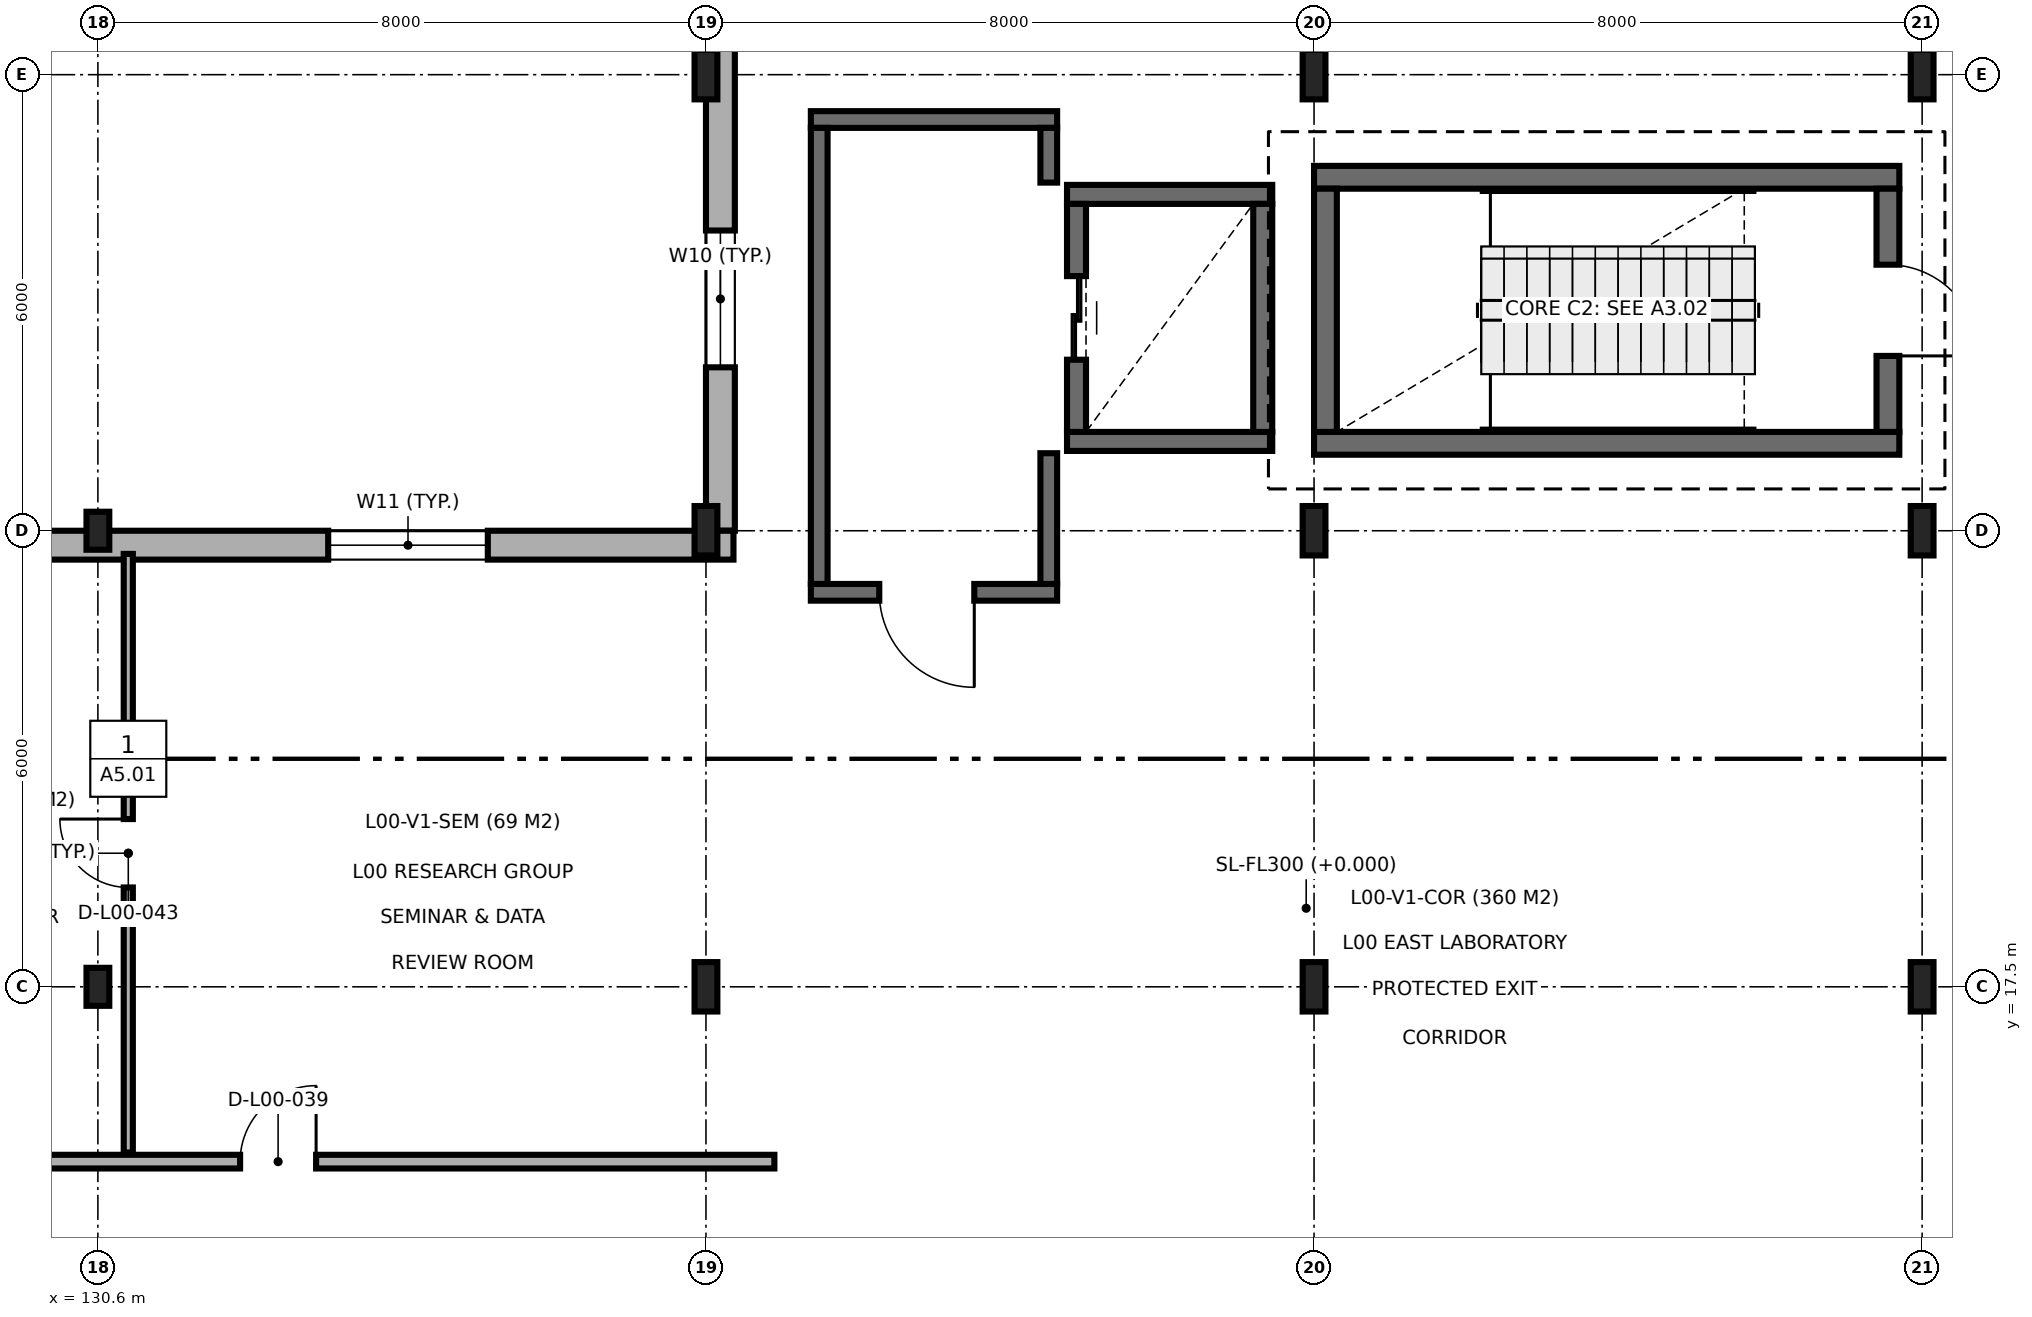
"""IFC4 building model, lengths in metres.
Left out: names, types, materials, properties, quantities, classifications, styles, units other than length and angle.
Written with IfcOpenShell. Run it as: python <this file> out.ifc"""

import sys

from ifc_helpers import new_model, si_unit, direction, frame, frame_2d, origin, origin_2d, place, context, subcontext, project, spatial, rectangle, i_section, extrude, element, fill, save


model = new_model("IFC4")
c1 = context("Model", 3, precision=1e-05, world=origin(), true_north=direction((0.0, 1.0)))
c2 = subcontext(c1, "Body", "Model", "MODEL_VIEW")
j1 = project(units=[si_unit("LENGTHUNIT", "METRE"), si_unit("PLANEANGLEUNIT", "RADIAN")], contexts=[c1])
p1 = place(None, origin())
s1 = spatial("IfcSite", under=j1, at=p1, CompositionType="ELEMENT")
p2 = place(p1, origin())
s2 = spatial("IfcBuilding", under=s1, at=p2, CompositionType="ELEMENT")
p3 = place(p2, origin())
s3 = spatial("IfcBuildingStorey", under=s2, at=p3, CompositionType="ELEMENT", Elevation=0.0)
for number, where, z_axis, x_axis in (
    (1, (130.6, 17.5, 0.0), (0.0, 0.0, 1.0), (1.0, 0.0, 0.0)),
    (2, (130.6, 23.5, 0.0), (0.0, 0.0, 1.0), (1.0, 0.0, 0.0)),
):
    element("IfcColumn", number, at=place(p3, frame(where, z_axis=z_axis, x_axis=x_axis)), inside=s3, PredefinedType="COLUMN", context=c2, shape_type="SweptSolid", body=[
        extrude(i_section(OverallWidth=0.3, OverallDepth=0.5, WebThickness=0.014, FlangeThickness=0.028, FilletRadius=0.027, at=origin_2d()), origin(), (0.0, 0.0, 1.0), 4.8),
    ])
for number, where, z_axis, x_axis in (
    (3, (138.6, 17.5, 0.0), (0.0, 0.0, 1.0), (1.0, 0.0, 0.0)),
    (4, (138.6, 23.5, 0.0), (0.0, 0.0, 1.0), (1.0, 0.0, 0.0)),
    (5, (138.6, 29.5, 0.0), (0.0, 0.0, 1.0), (1.0, 0.0, 0.0)),
    (6, (146.6, 17.5, 0.0), (0.0, 0.0, 1.0), (1.0, 0.0, 0.0)),
    (7, (146.6, 23.5, 0.0), (0.0, 0.0, 1.0), (1.0, 0.0, 0.0)),
    (8, (146.6, 29.5, 0.0), (0.0, 0.0, 1.0), (1.0, 0.0, 0.0)),
    (9, (154.6, 17.5, 0.0), (0.0, 0.0, 1.0), (1.0, 0.0, 0.0)),
    (10, (154.6, 23.5, 0.0), (0.0, 0.0, 1.0), (1.0, 0.0, 0.0)),
    (11, (154.6, 29.5, 0.0), (0.0, 0.0, 1.0), (1.0, 0.0, 0.0)),
):
    element("IfcColumn", number, at=place(p3, frame(where, z_axis=z_axis, x_axis=x_axis)), inside=s3, PredefinedType="COLUMN", context=c2, shape_type="SweptSolid", body=[
        extrude(i_section(OverallWidth=0.3, OverallDepth=0.65, WebThickness=0.016, FlangeThickness=0.031, FilletRadius=0.027, at=origin_2d()), origin(), (0.0, 0.0, 1.0), 4.8),
    ])
for number, where, z_axis, x_axis in (
    (12, (146.6, 24.65, 0.0), (0.0, 0.0, 1.0), (1.0, 0.0, 0.0)),
    (13, (154.3, 28.15, 0.0), (0.0, 0.0, 1.0), (-1.0, 0.0, 0.0)),
):
    element("IfcWall", number, at=place(p3, frame(where, z_axis=z_axis, x_axis=x_axis)), inside=s3, PredefinedType="SHEAR", context=c2, shape_type="SweptSolid", body=[
        extrude(rectangle(XDim=7.7, YDim=0.3, at=frame_2d((3.85, 0.0))), origin(), (0.0, 0.0, 1.0), 4.8),
    ])
p4 = place(p3, frame((146.75, 28.0, 0.0), z_axis=(0.0, 0.0, 1.0), x_axis=(0.0, -1.0, 0.0)))
e14 = element("IfcWall", 14, at=p4, inside=s3, PredefinedType="SHEAR", context=c2, shape_type="SweptSolid", body=[
    extrude(rectangle(XDim=3.2, YDim=0.3, at=frame_2d((1.6, 0.0))), origin(), (0.0, 0.0, 1.0), 4.8),
])
p5 = place(p3, frame((154.15, 24.8, 0.0), z_axis=(0.0, 0.0, 1.0), x_axis=(0.0, 1.0, 0.0)))
e15 = element("IfcWall", 15, at=p5, inside=s3, PredefinedType="SHEAR", context=c2, shape_type="SweptSolid", body=[
    extrude(rectangle(XDim=3.2, YDim=0.3, at=frame_2d((1.6, 0.0))), origin(), (0.0, 0.0, 1.0), 4.8),
])
p6 = place(p5, frame((1.0, 0.0, 0.0)))
e16 = element("IfcOpeningElement", 16, at=p6, cuts=e15, PredefinedType="OPENING", context=c2, shape_type="SweptSolid", body=[
    extrude(rectangle(XDim=1.2, YDim=2.15, at=frame_2d((0.6, 1.075))), frame((0.0, 0.16, 0.0), z_axis=(0.0, -1.0, 0.0), x_axis=(1.0, 0.0, 0.0)), (0.0, 0.0, 1.0), 0.32),
])
for number, where, z_axis, x_axis in (
    (17, (143.35, 24.675, 0.0), (0.0, 0.0, 1.0), (1.0, 0.0, 0.0)),
    (18, (146.05, 27.925, 0.0), (0.0, 0.0, 1.0), (-1.0, 0.0, 0.0)),
):
    element("IfcWall", number, at=place(p3, frame(where, z_axis=z_axis, x_axis=x_axis)), inside=s3, PredefinedType="SHEAR", context=c2, shape_type="SweptSolid", body=[
        extrude(rectangle(XDim=2.7, YDim=0.25, at=frame_2d((1.35, 0.0))), origin(), (0.0, 0.0, 1.0), 4.8),
    ])
p7 = place(p3, frame((143.475, 27.8, 0.0), z_axis=(0.0, 0.0, 1.0), x_axis=(0.0, -1.0, 0.0)))
e19 = element("IfcWall", 19, at=p7, inside=s3, PredefinedType="SHEAR", context=c2, shape_type="SweptSolid", body=[
    extrude(rectangle(XDim=3.0, YDim=0.25, at=frame_2d((1.5, 0.0))), origin(), (0.0, 0.0, 1.0), 4.8),
])
p8 = place(p7, frame((0.95, 0.0, 0.0)))
e20 = element("IfcOpeningElement", 20, at=p8, cuts=e19, PredefinedType="OPENING", context=c2, shape_type="SweptSolid", body=[
    extrude(rectangle(XDim=1.1, YDim=2.15, at=frame_2d((0.55, 1.075))), frame((0.0, 0.135, 0.0), z_axis=(0.0, -1.0, 0.0), x_axis=(1.0, 0.0, 0.0)), (0.0, 0.0, 1.0), 0.27),
])
p9 = place(p3, frame((145.925, 24.8, 0.0), z_axis=(0.0, 0.0, 1.0), x_axis=(0.0, 1.0, 0.0)))
e21 = element("IfcWall", 21, at=p9, inside=s3, PredefinedType="SHEAR", context=c2, shape_type="SweptSolid", body=[
    extrude(rectangle(XDim=3.0, YDim=0.25, at=frame_2d((1.5, 0.0))), origin(), (0.0, 0.0, 1.0), 4.8),
])
p10 = place(p3, frame((139.98, 22.69, 0.0), z_axis=(0.0, 0.0, 1.0), x_axis=(1.0, 0.0, 0.0)))
e22 = element("IfcWall", 22, at=p10, inside=s3, PredefinedType="SOLIDWALL", context=c2, shape_type="SweptSolid", body=[
    extrude(rectangle(XDim=3.24, YDim=0.22, at=frame_2d((1.62, 0.0))), origin(), (0.0, 0.0, 1.0), 4.55),
])
p11 = place(p10, frame((0.9, 0.0, 0.0)))
e23 = element("IfcOpeningElement", 23, at=p11, cuts=e22, PredefinedType="OPENING", context=c2, shape_type="SweptSolid", body=[
    extrude(rectangle(XDim=1.25, YDim=2.15, at=frame_2d((0.625, 1.075))), frame((0.0, 0.12, 0.0), z_axis=(0.0, -1.0, 0.0), x_axis=(1.0, 0.0, 0.0)), (0.0, 0.0, 1.0), 0.24),
])
p12 = place(p3, frame((143.22, 28.91, 0.0), z_axis=(0.0, 0.0, 1.0), x_axis=(-1.0, 0.0, 0.0)))
e24 = element("IfcWall", 24, at=p12, inside=s3, PredefinedType="SOLIDWALL", context=c2, shape_type="SweptSolid", body=[
    extrude(rectangle(XDim=3.24, YDim=0.22, at=frame_2d((1.62, 0.0))), origin(), (0.0, 0.0, 1.0), 4.55),
])
p13 = place(p3, frame((140.09, 28.8, 0.0), z_axis=(0.0, 0.0, 1.0), x_axis=(0.0, -1.0, 0.0)))
e25 = element("IfcWall", 25, at=p13, inside=s3, PredefinedType="SOLIDWALL", context=c2, shape_type="SweptSolid", body=[
    extrude(rectangle(XDim=6.0, YDim=0.22, at=frame_2d((3.0, 0.0))), origin(), (0.0, 0.0, 1.0), 4.55),
])
p14 = place(p3, frame((143.11, 22.8, 0.0), z_axis=(0.0, 0.0, 1.0), x_axis=(0.0, 1.0, 0.0)))
e26 = element("IfcWall", 26, at=p14, inside=s3, PredefinedType="SOLIDWALL", context=c2, shape_type="SweptSolid", body=[
    extrude(rectangle(XDim=1.72, YDim=0.22, at=frame_2d((0.86, 0.0))), origin(), (0.0, 0.0, 1.0), 4.55),
])
p15 = place(p3, frame((143.11, 28.08, 0.0), z_axis=(0.0, 0.0, 1.0), x_axis=(0.0, 1.0, 0.0)))
e27 = element("IfcWall", 27, at=p15, inside=s3, PredefinedType="SOLIDWALL", context=c2, shape_type="SweptSolid", body=[
    extrude(rectangle(XDim=0.72, YDim=0.22, at=frame_2d((0.36, 0.0))), origin(), (0.0, 0.0, 1.0), 4.55),
])
p16 = place(p3, frame((138.79, 41.138, 0.0), z_axis=(0.0, 0.0, 1.0), x_axis=(0.0, -1.0, 0.0)))
e28 = element("IfcWall", 28, at=p16, inside=s3, PredefinedType="SOLIDWALL", context=c2, shape_type="SweptSolid", body=[
    extrude(rectangle(XDim=17.638, YDim=0.38, at=frame_2d((8.819, 0.0))), origin(), (0.0, 0.0, 1.0), 4.55),
])
p17 = place(p16, frame((8.048, 0.0, 0.9)))
e29 = element("IfcOpeningElement", 29, at=p17, cuts=e28, PredefinedType="OPENING", context=c2, shape_type="SweptSolid", body=[
    extrude(rectangle(XDim=1.2, YDim=2.1, at=frame_2d((0.6, 1.05))), frame((0.0, 0.2, 0.0), z_axis=(0.0, -1.0, 0.0), x_axis=(1.0, 0.0, 0.0)), (0.0, 0.0, 1.0), 0.4),
])
p18 = place(p16, frame((13.688, 0.0, 0.9)))
e30 = element("IfcOpeningElement", 30, at=p18, cuts=e28, PredefinedType="OPENING", context=c2, shape_type="SweptSolid", body=[
    extrude(rectangle(XDim=1.8, YDim=2.1, at=frame_2d((0.9, 1.05))), frame((0.0, 0.2, 0.0), z_axis=(0.0, -1.0, 0.0), x_axis=(1.0, 0.0, 0.0)), (0.0, 0.0, 1.0), 0.4),
])
p19 = place(p3, frame((138.962, 23.31, 0.0), z_axis=(0.0, 0.0, 1.0), x_axis=(-1.0, 0.0, 0.0)))
e31 = element("IfcWall", 31, at=p19, inside=s3, PredefinedType="SOLIDWALL", context=c2, shape_type="SweptSolid", body=[
    extrude(rectangle(XDim=33.9, YDim=0.38, at=frame_2d((16.95, 0.0))), origin(), (0.0, 0.0, 1.0), 4.55),
])
p20 = place(p19, frame((3.232, 0.0, 0.9)))
e32 = element("IfcOpeningElement", 32, at=p20, cuts=e31, PredefinedType="OPENING", context=c2, shape_type="SweptSolid", body=[
    extrude(rectangle(XDim=2.1, YDim=2.1, at=frame_2d((1.05, 1.05))), frame((0.0, 0.2, 0.0), z_axis=(0.0, -1.0, 0.0), x_axis=(1.0, 0.0, 0.0)), (0.0, 0.0, 1.0), 0.4),
])
p21 = place(p19, frame((11.542, 0.0, 0.9)))
e33 = element("IfcOpeningElement", 33, at=p21, cuts=e31, PredefinedType="OPENING", context=c2, shape_type="SweptSolid", body=[
    extrude(rectangle(XDim=2.7, YDim=2.1, at=frame_2d((1.35, 1.05))), frame((0.0, 0.2, 0.0), z_axis=(0.0, -1.0, 0.0), x_axis=(1.0, 0.0, 0.0)), (0.0, 0.0, 1.0), 0.4),
])
p22 = place(p19, frame((18.232, 0.0, 0.9)))
e34 = element("IfcOpeningElement", 34, at=p22, cuts=e31, PredefinedType="OPENING", context=c2, shape_type="SweptSolid", body=[
    extrude(rectangle(XDim=1.2, YDim=1.5, at=frame_2d((0.6, 0.75))), frame((0.0, 0.2, 0.0), z_axis=(0.0, -1.0, 0.0), x_axis=(1.0, 0.0, 0.0)), (0.0, 0.0, 1.0), 0.4),
])
p23 = place(p19, frame((21.612, 0.0, 0.9)))
e35 = element("IfcOpeningElement", 35, at=p23, cuts=e31, PredefinedType="OPENING", context=c2, shape_type="SweptSolid", body=[
    extrude(rectangle(XDim=1.8, YDim=1.5, at=frame_2d((0.9, 0.75))), frame((0.0, 0.2, 0.0), z_axis=(0.0, -1.0, 0.0), x_axis=(1.0, 0.0, 0.0)), (0.0, 0.0, 1.0), 0.4),
])
p24 = place(p19, frame((27.762, 0.0, 0.9)))
e36 = element("IfcOpeningElement", 36, at=p24, cuts=e31, PredefinedType="OPENING", context=c2, shape_type="SweptSolid", body=[
    extrude(rectangle(XDim=1.2, YDim=2.4, at=frame_2d((0.6, 1.2))), frame((0.0, 0.2, 0.0), z_axis=(0.0, -1.0, 0.0), x_axis=(1.0, 0.0, 0.0)), (0.0, 0.0, 1.0), 0.4),
])
p25 = place(p3, frame((105.005, 15.2, 0.0), z_axis=(0.0, 0.0, 1.0), x_axis=(1.0, 0.0, 0.0)))
e37 = element("IfcWall", 37, at=p25, inside=s3, PredefinedType="PARTITIONING", context=c2, shape_type="SweptSolid", body=[
    extrude(rectangle(XDim=34.495, YDim=0.18, at=frame_2d((17.248, 0.0))), origin(), (0.0, 0.0, 1.0), 4.55),
])
p26 = place(p25, frame((7.391, 0.0, 0.0)))
e38 = element("IfcOpeningElement", 38, at=p26, cuts=e37, PredefinedType="OPENING", context=c2, shape_type="SweptSolid", body=[
    extrude(rectangle(XDim=0.9, YDim=2.1, at=frame_2d((0.45, 1.05))), frame((0.0, 0.1, 0.0), z_axis=(0.0, -1.0, 0.0), x_axis=(1.0, 0.0, 0.0)), (0.0, 0.0, 1.0), 0.2),
])
p27 = place(p25, frame((18.45, 0.0, 0.0)))
e39 = element("IfcOpeningElement", 39, at=p27, cuts=e37, PredefinedType="OPENING", context=c2, shape_type="SweptSolid", body=[
    extrude(rectangle(XDim=0.95, YDim=2.1, at=frame_2d((0.475, 1.05))), frame((0.0, 0.1, 0.0), z_axis=(0.0, -1.0, 0.0), x_axis=(1.0, 0.0, 0.0)), (0.0, 0.0, 1.0), 0.2),
])
p28 = place(p25, frame((27.466, 0.0, 0.0)))
e40 = element("IfcOpeningElement", 40, at=p28, cuts=e37, PredefinedType="OPENING", context=c2, shape_type="SweptSolid", body=[
    extrude(rectangle(XDim=1.0, YDim=2.15, at=frame_2d((0.5, 1.075))), frame((0.0, 0.1, 0.0), z_axis=(0.0, -1.0, 0.0), x_axis=(1.0, 0.0, 0.0)), (0.0, 0.0, 1.0), 0.2),
])
p29 = place(p3, frame((131.0, 15.32, 0.0), z_axis=(0.0, 0.0, 1.0), x_axis=(0.0, 1.0, 0.0)))
e41 = element("IfcWall", 41, at=p29, inside=s3, PredefinedType="PARTITIONING", context=c2, shape_type="SweptSolid", body=[
    extrude(rectangle(XDim=7.875, YDim=0.12, at=frame_2d((3.938, 0.0))), origin(), (0.0, 0.0, 1.0), 4.55),
])
p30 = place(p29, frame((3.487, 0.0, 0.0)))
e42 = element("IfcOpeningElement", 42, at=p30, cuts=e41, PredefinedType="OPENING", context=c2, shape_type="SweptSolid", body=[
    extrude(rectangle(XDim=0.9, YDim=2.1, at=frame_2d((0.45, 1.05))), frame((0.0, 0.07, 0.0), z_axis=(0.0, -1.0, 0.0), x_axis=(1.0, 0.0, 0.0)), (0.0, 0.0, 1.0), 0.14),
])
p31 = place(p6, frame((1.2, 0.0, 0.0), z_axis=(0.0, 0.0, 1.0), x_axis=(-1.0, 0.0, 0.0)))
e43 = element("IfcDoor", 43, at=p31, inside=s3, OperationType="SINGLE_SWING_LEFT", PredefinedType="DOOR", context=c2, shape_type="SweptSolid", body=[
    extrude(rectangle(XDim=1.2, YDim=2.15, at=frame_2d((0.6, 1.075))), frame((0.0, 0.025, 0.0), z_axis=(0.0, -1.0, 0.0), x_axis=(1.0, 0.0, 0.0)), (0.0, 0.0, 1.0), 0.05),
])
fill(e16, e43)
p32 = place(p8, origin())
e44 = element("IfcDoor", 44, at=p32, inside=s3, OperationType="DOUBLE_DOOR_SLIDING", PredefinedType="DOOR", context=c2, shape_type="SweptSolid", body=[
    extrude(rectangle(XDim=1.1, YDim=2.15, at=frame_2d((0.55, 1.075))), frame((0.0, 0.025, 0.0), z_axis=(0.0, -1.0, 0.0), x_axis=(1.0, 0.0, 0.0)), (0.0, 0.0, 1.0), 0.05),
])
fill(e20, e44)
p33 = place(p11, frame((1.25, 0.0, 0.0), z_axis=(0.0, 0.0, 1.0), x_axis=(-1.0, 0.0, 0.0)))
e45 = element("IfcDoor", 45, at=p33, inside=s3, OperationType="SINGLE_SWING_RIGHT", PredefinedType="DOOR", context=c2, shape_type="SweptSolid", body=[
    extrude(rectangle(XDim=1.25, YDim=2.15, at=frame_2d((0.625, 1.075))), frame((0.0, 0.025, 0.0), z_axis=(0.0, -1.0, 0.0), x_axis=(1.0, 0.0, 0.0)), (0.0, 0.0, 1.0), 0.05),
])
fill(e23, e45)
p34 = place(p18, origin())
e46 = element("IfcWindow", 46, at=p34, inside=s3, PartitioningType="SINGLE_PANEL", PredefinedType="WINDOW", context=c2, shape_type="SweptSolid", body=[
    extrude(rectangle(XDim=1.8, YDim=2.1, at=frame_2d((0.9, 1.05))), frame((0.0, 0.03, 0.0), z_axis=(0.0, -1.0, 0.0), x_axis=(1.0, 0.0, 0.0)), (0.0, 0.0, 1.0), 0.06),
])
fill(e30, e46)
p35 = place(p20, origin())
e47 = element("IfcWindow", 47, at=p35, inside=s3, PartitioningType="SINGLE_PANEL", PredefinedType="WINDOW", context=c2, shape_type="SweptSolid", body=[
    extrude(rectangle(XDim=2.1, YDim=2.1, at=frame_2d((1.05, 1.05))), frame((0.0, 0.03, 0.0), z_axis=(0.0, -1.0, 0.0), x_axis=(1.0, 0.0, 0.0)), (0.0, 0.0, 1.0), 0.06),
])
fill(e32, e47)
p36 = place(p28, origin())
e48 = element("IfcDoor", 48, at=p36, inside=s3, OperationType="SINGLE_SWING_RIGHT", PredefinedType="DOOR", context=c2, shape_type="SweptSolid", body=[
    extrude(rectangle(XDim=1.0, YDim=2.15, at=frame_2d((0.5, 1.075))), frame((0.0, 0.025, 0.0), z_axis=(0.0, -1.0, 0.0), x_axis=(1.0, 0.0, 0.0)), (0.0, 0.0, 1.0), 0.05),
])
fill(e40, e48)
p37 = place(p30, origin())
e49 = element("IfcDoor", 49, at=p37, inside=s3, OperationType="SINGLE_SWING_RIGHT", PredefinedType="DOOR", context=c2, shape_type="SweptSolid", body=[
    extrude(rectangle(XDim=0.9, YDim=2.1, at=frame_2d((0.45, 1.05))), frame((0.0, 0.025, 0.0), z_axis=(0.0, -1.0, 0.0), x_axis=(1.0, 0.0, 0.0)), (0.0, 0.0, 1.0), 0.05),
])
fill(e42, e49)
save(model, sys.argv[1])
